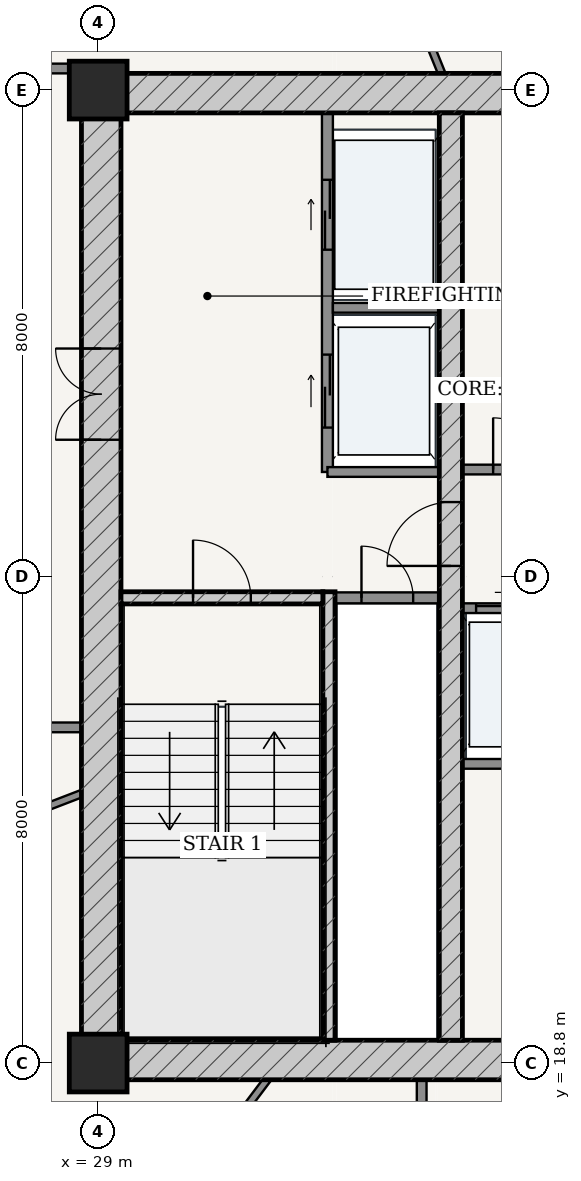
"""IFC4 building model, lengths in metres.
Left out: names, types, materials, properties, quantities, classifications, styles, units other than length and angle.
Written with IfcOpenShell. Run it as: python <this file> out.ifc"""

import sys

from ifc_helpers import new_model, si_unit, direction, frame, frame_2d, origin, origin_2d, place, context, subcontext, project, spatial, rectangle, extrude, source, transform, mapped, element, fill, save


model = new_model("IFC4")
c1 = context("Model", 3, precision=1e-05, world=origin(), true_north=direction((-0.2419218956, 0.970295726276)))
c2 = subcontext(c1, "Body", "Model", "MODEL_VIEW")
j1 = project(units=[si_unit("LENGTHUNIT", "METRE"), si_unit("PLANEANGLEUNIT", "RADIAN")], contexts=[c1])
p1 = place(None, origin())
s1 = spatial("IfcSite", under=j1, at=p1, CompositionType="ELEMENT")
p2 = place(p1, origin())
s2 = spatial("IfcBuilding", under=s1, at=p2, CompositionType="ELEMENT")
p3 = place(p2, frame((0.0, 0.0, 178.6)))
s3 = spatial("IfcBuildingStorey", under=s2, at=p3, CompositionType="ELEMENT", Elevation=178.6)
for number, where, z_axis, x_axis in (
    (1, (29.0, 18.8, 0.0), (0.0, 0.0, 1.0), (1.0, 0.0, 0.0)),
    (2, (29.0, 34.8, 0.0), (0.0, 0.0, 1.0), (1.0, 0.0, 0.0)),
):
    element("IfcColumn", number, at=place(p3, frame(where, z_axis=z_axis, x_axis=x_axis)), inside=s3, PredefinedType="COLUMN", context=c2, shape_type="SweptSolid", body=[
        extrude(rectangle(XDim=0.95, YDim=0.95, at=origin_2d()), origin(), (0.0, 0.0, 1.0), 3.6),
    ])
p4 = place(p3, frame((28.725, 18.85, 0.0), z_axis=(0.0, 0.0, 1.0), x_axis=(1.0, 0.0, 0.0)))
e3 = element("IfcWall", 3, at=p4, inside=s3, PredefinedType="SHEAR", context=c2, shape_type="SweptSolid", body=[
    extrude(rectangle(XDim=18.55, YDim=0.65, at=frame_2d((9.275, 0.0))), origin(), (0.0, 0.0, 1.0), 3.33),
])
p5 = place(p4, frame((7.51, 0.0, 0.0)))
e4 = element("IfcOpeningElement", 4, at=p5, cuts=e3, PredefinedType="OPENING", context=c2, shape_type="SweptSolid", body=[
    extrude(rectangle(XDim=0.85, YDim=2.1, at=frame_2d((0.425, 1.05))), frame((0.0, 0.335, 0.0), z_axis=(0.0, -1.0, 0.0), x_axis=(1.0, 0.0, 0.0)), (0.0, 0.0, 1.0), 0.67),
])
p6 = place(p4, frame((10.59, 0.0, 0.0)))
e5 = element("IfcOpeningElement", 5, at=p6, cuts=e3, PredefinedType="OPENING", context=c2, shape_type="SweptSolid", body=[
    extrude(rectangle(XDim=0.85, YDim=2.1, at=frame_2d((0.425, 1.05))), frame((0.0, 0.335, 0.0), z_axis=(0.0, -1.0, 0.0), x_axis=(1.0, 0.0, 0.0)), (0.0, 0.0, 1.0), 0.67),
])
p7 = place(p3, frame((28.725, 34.75, 0.0), z_axis=(0.0, 0.0, 1.0), x_axis=(1.0, 0.0, 0.0)))
e6 = element("IfcWall", 6, at=p7, inside=s3, PredefinedType="SHEAR", context=c2, shape_type="SweptSolid", body=[
    extrude(rectangle(XDim=18.55, YDim=0.65, at=frame_2d((9.275, 0.0))), origin(), (0.0, 0.0, 1.0), 3.33),
])
p8 = place(p3, frame((29.05, 19.175, 0.0), z_axis=(0.0, 0.0, 1.0), x_axis=(0.0, 1.0, 0.0)))
e7 = element("IfcWall", 7, at=p8, inside=s3, PredefinedType="SHEAR", context=c2, shape_type="SweptSolid", body=[
    extrude(rectangle(XDim=15.25, YDim=0.65, at=frame_2d((7.625, 0.0))), origin(), (0.0, 0.0, 1.0), 3.33),
])
p9 = place(p8, frame((9.875, 0.0, 0.0)))
e8 = element("IfcOpeningElement", 8, at=p9, cuts=e7, PredefinedType="OPENING", context=c2, shape_type="SweptSolid", body=[
    extrude(rectangle(XDim=1.5, YDim=2.2, at=frame_2d((0.75, 1.1))), frame((0.0, 0.335, 0.0), z_axis=(0.0, -1.0, 0.0), x_axis=(1.0, 0.0, 0.0)), (0.0, 0.0, 1.0), 0.67),
])
p10 = place(p3, frame((32.795, 19.175, 0.0), z_axis=(0.0, 0.0, 1.0), x_axis=(0.0, 1.0, 0.0)))
e9 = element("IfcWall", 9, at=p10, inside=s3, PredefinedType="SOLIDWALL", context=c2, shape_type="SweptSolid", body=[
    extrude(rectangle(XDim=7.375, YDim=0.2, at=frame_2d((3.688, 0.0))), origin(), (0.0, 0.0, 1.0), 3.33),
])
p11 = place(p3, frame((29.375, 26.45, 0.0), z_axis=(0.0, 0.0, 1.0), x_axis=(1.0, 0.0, 0.0)))
e10 = element("IfcWall", 10, at=p11, inside=s3, PredefinedType="SOLIDWALL", context=c2, shape_type="SweptSolid", body=[
    extrude(rectangle(XDim=3.32, YDim=0.2, at=frame_2d((1.66, 0.0))), origin(), (0.0, 0.0, 1.0), 3.33),
])
p12 = place(p11, frame((1.185, 0.0, 0.0)))
e11 = element("IfcOpeningElement", 11, at=p12, cuts=e10, PredefinedType="OPENING", context=c2, shape_type="SweptSolid", body=[
    extrude(rectangle(XDim=0.95, YDim=2.15, at=frame_2d((0.475, 1.075))), frame((0.0, 0.11, 0.0), z_axis=(0.0, -1.0, 0.0), x_axis=(1.0, 0.0, 0.0)), (0.0, 0.0, 1.0), 0.22),
])
p13 = place(p3, frame((34.8, 19.175, 0.0), z_axis=(0.0, 0.0, 1.0), x_axis=(0.0, 1.0, 0.0)))
e12 = element("IfcWall", 12, at=p13, inside=s3, PredefinedType="SHEAR", context=c2, shape_type="SweptSolid", body=[
    extrude(rectangle(XDim=15.25, YDim=0.38, at=frame_2d((7.625, 0.0))), origin(), (0.0, 0.0, 1.0), 3.33),
])
p14 = place(p13, frame((7.8, 0.0, 0.0)))
e13 = element("IfcOpeningElement", 13, at=p14, cuts=e12, PredefinedType="OPENING", context=c2, shape_type="SweptSolid", body=[
    extrude(rectangle(XDim=1.05, YDim=2.15, at=frame_2d((0.525, 1.075))), frame((0.0, 0.2, 0.0), z_axis=(0.0, -1.0, 0.0), x_axis=(1.0, 0.0, 0.0)), (0.0, 0.0, 1.0), 0.4),
])
p15 = place(p3, frame((32.9, 26.45, 0.0), z_axis=(0.0, 0.0, 1.0), x_axis=(1.0, 0.0, 0.0)))
e14 = element("IfcWall", 14, at=p15, inside=s3, PredefinedType="PARTITIONING", context=c2, shape_type="SweptSolid", body=[
    extrude(rectangle(XDim=1.71, YDim=0.18, at=frame_2d((0.855, 0.0))), origin(), (0.0, 0.0, 1.0), 3.33),
])
p16 = place(p15, frame((0.43, 0.0, 0.0)))
e15 = element("IfcOpeningElement", 15, at=p16, cuts=e14, PredefinedType="OPENING", context=c2, shape_type="SweptSolid", body=[
    extrude(rectangle(XDim=0.85, YDim=2.1, at=frame_2d((0.425, 1.05))), frame((0.0, 0.1, 0.0), z_axis=(0.0, -1.0, 0.0), x_axis=(1.0, 0.0, 0.0)), (0.0, 0.0, 1.0), 0.2),
])
p17 = place(p3, frame((32.77, 28.52, 0.0), z_axis=(0.0, 0.0, 1.0), x_axis=(0.0, 1.0, 0.0)))
e16 = element("IfcWall", 16, at=p17, inside=s3, PredefinedType="PARTITIONING", context=c2, shape_type="SweptSolid", body=[
    extrude(rectangle(XDim=5.905, YDim=0.18, at=frame_2d((2.953, 0.0))), origin(), (0.0, 0.0, 1.0), 3.33),
])
p18 = place(p17, frame((3.655, 0.0, 0.0)))
e17 = element("IfcOpeningElement", 17, at=p18, cuts=e16, PredefinedType="OPENING", context=c2, shape_type="SweptSolid", body=[
    extrude(rectangle(XDim=1.15, YDim=2.2, at=frame_2d((0.575, 1.1))), frame((0.0, 0.1, 0.0), z_axis=(0.0, -1.0, 0.0), x_axis=(1.0, 0.0, 0.0)), (0.0, 0.0, 1.0), 0.2),
])
p19 = place(p17, frame((0.73, 0.0, 0.0)))
e18 = element("IfcOpeningElement", 18, at=p19, cuts=e16, PredefinedType="OPENING", context=c2, shape_type="SweptSolid", body=[
    extrude(rectangle(XDim=1.2, YDim=2.25, at=frame_2d((0.6, 1.125))), frame((0.0, 0.1, 0.0), z_axis=(0.0, -1.0, 0.0), x_axis=(1.0, 0.0, 0.0)), (0.0, 0.0, 1.0), 0.2),
])
p20 = place(p3, frame((32.86, 31.22, 0.0), z_axis=(0.0, 0.0, 1.0), x_axis=(1.0, 0.0, 0.0)))
e19 = element("IfcWall", 19, at=p20, inside=s3, PredefinedType="PARTITIONING", context=c2, shape_type="SweptSolid", body=[
    extrude(rectangle(XDim=1.75, YDim=0.16, at=frame_2d((0.875, 0.0))), origin(), (0.0, 0.0, 1.0), 3.33),
])
p21 = place(p3, frame((32.77, 28.52, 0.0), z_axis=(0.0, 0.0, 1.0), x_axis=(1.0, 0.0, 0.0)))
e20 = element("IfcWall", 20, at=p21, inside=s3, PredefinedType="PARTITIONING", context=c2, shape_type="SweptSolid", body=[
    extrude(rectangle(XDim=1.84, YDim=0.16, at=frame_2d((0.92, 0.0))), origin(), (0.0, 0.0, 1.0), 3.33),
])
p22 = place(p3, frame((34.99, 28.56, 0.0), z_axis=(0.0, 0.0, 1.0), x_axis=(1.0, 0.0, 0.0)))
e21 = element("IfcWall", 21, at=p22, inside=s3, PredefinedType="PARTITIONING", context=c2, shape_type="SweptSolid", body=[
    extrude(rectangle(XDim=6.02, YDim=0.16, at=frame_2d((3.01, 0.0))), origin(), (0.0, 0.0, 1.0), 3.33),
])
p23 = place(p22, frame((0.505, 0.0, 0.0)))
e22 = element("IfcOpeningElement", 22, at=p23, cuts=e21, PredefinedType="OPENING", context=c2, shape_type="SweptSolid", body=[
    extrude(rectangle(XDim=0.85, YDim=2.1, at=frame_2d((0.425, 1.05))), frame((0.0, 0.09, 0.0), z_axis=(0.0, -1.0, 0.0), x_axis=(1.0, 0.0, 0.0)), (0.0, 0.0, 1.0), 0.18),
])
p24 = place(p22, frame((2.58, 0.0, 0.0)))
e23 = element("IfcOpeningElement", 23, at=p24, cuts=e21, PredefinedType="OPENING", context=c2, shape_type="SweptSolid", body=[
    extrude(rectangle(XDim=0.86, YDim=2.1, at=frame_2d((0.43, 1.05))), frame((0.0, 0.09, 0.0), z_axis=(0.0, -1.0, 0.0), x_axis=(1.0, 0.0, 0.0)), (0.0, 0.0, 1.0), 0.18),
])
p25 = place(p22, frame((4.665, 0.0, 0.0)))
e24 = element("IfcOpeningElement", 24, at=p25, cuts=e21, PredefinedType="OPENING", context=c2, shape_type="SweptSolid", body=[
    extrude(rectangle(XDim=0.85, YDim=2.1, at=frame_2d((0.425, 1.05))), frame((0.0, 0.09, 0.0), z_axis=(0.0, -1.0, 0.0), x_axis=(1.0, 0.0, 0.0)), (0.0, 0.0, 1.0), 0.18),
])
p26 = place(p3, frame((34.99, 26.28, 0.0), z_axis=(0.0, 0.0, 1.0), x_axis=(1.0, 0.0, 0.0)))
e25 = element("IfcWall", 25, at=p26, inside=s3, PredefinedType="PARTITIONING", context=c2, shape_type="SweptSolid", body=[
    extrude(rectangle(XDim=6.02, YDim=0.16, at=frame_2d((3.01, 0.0))), origin(), (0.0, 0.0, 1.0), 3.33),
])
p27 = place(p26, frame((0.225, 0.0, 0.0)))
e26 = element("IfcOpeningElement", 26, at=p27, cuts=e25, PredefinedType="OPENING", context=c2, shape_type="SweptSolid", body=[
    extrude(rectangle(XDim=1.1, YDim=2.2, at=frame_2d((0.55, 1.1))), frame((0.0, 0.09, 0.0), z_axis=(0.0, -1.0, 0.0), x_axis=(1.0, 0.0, 0.0)), (0.0, 0.0, 1.0), 0.18),
])
p28 = place(p26, frame((1.705, 0.0, 0.0)))
e27 = element("IfcOpeningElement", 27, at=p28, cuts=e25, PredefinedType="OPENING", context=c2, shape_type="SweptSolid", body=[
    extrude(rectangle(XDim=1.1, YDim=2.2, at=frame_2d((0.55, 1.1))), frame((0.0, 0.09, 0.0), z_axis=(0.0, -1.0, 0.0), x_axis=(1.0, 0.0, 0.0)), (0.0, 0.0, 1.0), 0.18),
])
p29 = place(p3, frame((34.99, 23.72, 0.0), z_axis=(0.0, 0.0, 1.0), x_axis=(1.0, 0.0, 0.0)))
e28 = element("IfcWall", 28, at=p29, inside=s3, PredefinedType="PARTITIONING", context=c2, shape_type="SweptSolid", body=[
    extrude(rectangle(XDim=6.02, YDim=0.16, at=frame_2d((3.01, 0.0))), origin(), (0.0, 0.0, 1.0), 3.33),
])
p30 = place(p3, frame((26.795, 35.155, 0.0), z_axis=(0.0, 0.0, 1.0), x_axis=(1.0, 0.0, 0.0)))
e29 = element("IfcWall", 29, at=p30, inside=s3, PredefinedType="PARTITIONING", context=c2, shape_type="SweptSolid", body=[
    extrude(rectangle(XDim=1.93, YDim=0.16, at=frame_2d((0.965, 0.0))), origin(), (0.0, 0.0, 1.0), 2.776),
])
p31 = place(p3, frame((26.795, 24.32, 0.0), z_axis=(0.0, 0.0, 1.0), x_axis=(1.0, 0.0, 0.0)))
e30 = element("IfcWall", 30, at=p31, inside=s3, PredefinedType="PARTITIONING", context=c2, shape_type="SweptSolid", body=[
    extrude(rectangle(XDim=1.93, YDim=0.16, at=frame_2d((0.965, 0.0))), origin(), (0.0, 0.0, 1.0), 3.33),
])
p32 = place(p3, frame((34.32, 16.675, 0.0), z_axis=(0.0, 0.0, 1.0), x_axis=(0.0, 1.0, 0.0)))
e31 = element("IfcWall", 31, at=p32, inside=s3, PredefinedType="PARTITIONING", context=c2, shape_type="SweptSolid", body=[
    extrude(rectangle(XDim=1.85, YDim=0.16, at=frame_2d((0.925, 0.0))), origin(), (0.0, 0.0, 1.0), 3.33),
])
p33 = place(p32, frame((0.435, 0.0, 0.0)))
e32 = element("IfcOpeningElement", 32, at=p33, cuts=e31, PredefinedType="OPENING", context=c2, shape_type="SweptSolid", body=[
    extrude(rectangle(XDim=0.98, YDim=2.2, at=frame_2d((0.49, 1.1))), frame((0.0, 0.09, 0.0), z_axis=(0.0, -1.0, 0.0), x_axis=(1.0, 0.0, 0.0)), (0.0, 0.0, 1.0), 0.18),
])
p34 = place(p3, frame((34.649, 35.075, 0.0), z_axis=(0.0, 0.0, 1.0), x_axis=(-0.375339921816, 0.926887233212, 0.0)))
e33 = element("IfcWall", 33, at=p34, inside=s3, PredefinedType="PARTITIONING", context=c2, shape_type="SweptSolid", body=[
    extrude(rectangle(XDim=3.088, YDim=0.12, at=frame_2d((1.544, 0.0))), origin(), (0.0, 0.0, 1.0), 3.33),
])
p35 = place(p3, frame((28.723, 23.229, 0.0), z_axis=(0.0, 0.0, 1.0), x_axis=(-0.933262385607, -0.359195378048, 0.0)))
e34 = element("IfcWall", 34, at=p35, inside=s3, PredefinedType="PARTITIONING", context=c2, shape_type="SweptSolid", body=[
    extrude(rectangle(XDim=5.219, YDim=0.12, at=frame_2d((2.609, 0.0))), origin(), (0.0, 0.0, 1.0), 3.33),
])
p36 = place(p35, frame((2.179, 0.0, 0.0)))
e35 = element("IfcOpeningElement", 35, at=p36, cuts=e34, PredefinedType="OPENING", context=c2, shape_type="SweptSolid", body=[
    extrude(rectangle(XDim=0.86, YDim=2.15, at=frame_2d((0.43, 1.075))), frame((0.0, 0.07, 0.0), z_axis=(0.0, -1.0, 0.0), x_axis=(1.0, 0.0, 0.0)), (0.0, 0.0, 1.0), 0.14),
])
p37 = place(p3, frame((31.777, 18.525, 0.0), z_axis=(0.0, 0.0, 1.0), x_axis=(-0.601054484551, -0.799208049635, 0.0)))
e36 = element("IfcWall", 36, at=p37, inside=s3, PredefinedType="PARTITIONING", context=c2, shape_type="SweptSolid", body=[
    extrude(rectangle(XDim=3.592, YDim=0.12, at=frame_2d((1.796, 0.0))), origin(), (0.0, 0.0, 1.0), 3.33),
])
p38 = place(p37, frame((1.346, 0.0, 0.0)))
e37 = element("IfcOpeningElement", 37, at=p38, cuts=e36, PredefinedType="OPENING", context=c2, shape_type="SweptSolid", body=[
    extrude(rectangle(XDim=0.9, YDim=2.15, at=frame_2d((0.45, 1.075))), frame((0.0, 0.07, 0.0), z_axis=(0.0, -1.0, 0.0), x_axis=(1.0, 0.0, 0.0)), (0.0, 0.0, 1.0), 0.14),
])
m1 = source(origin(), c2, "Body", "SweptSolid", [
    extrude(rectangle(XDim=1.5, YDim=2.2, at=frame_2d((0.75, 1.1))), frame((0.0, 0.025, 0.0), z_axis=(0.0, -1.0, 0.0), x_axis=(1.0, 0.0, 0.0)), (0.0, 0.0, 1.0), 0.05),
])
p39 = place(p9, origin())
e38 = element("IfcDoor", 38, at=p39, inside=s3, OperationType="DOUBLE_DOOR_SINGLE_SWING", PredefinedType="DOOR", context=c2, shape_type="MappedRepresentation", body=[
    mapped(m1, transform((0.0, 0.0, 0.0), scale=1.0)),
])
fill(e8, e38)
m2 = source(origin(), c2, "Body", "SweptSolid", [
    extrude(rectangle(XDim=1.05, YDim=2.15, at=frame_2d((0.525, 1.075))), frame((0.0, 0.025, 0.0), z_axis=(0.0, -1.0, 0.0), x_axis=(1.0, 0.0, 0.0)), (0.0, 0.0, 1.0), 0.05),
])
p40 = place(p14, origin())
e39 = element("IfcDoor", 39, at=p40, inside=s3, OperationType="SINGLE_SWING_LEFT", PredefinedType="DOOR", context=c2, shape_type="MappedRepresentation", body=[
    mapped(m2, transform((0.0, 0.0, 0.0), scale=1.0)),
])
fill(e13, e39)
m3 = source(origin(), c2, "Body", "SweptSolid", [
    extrude(rectangle(XDim=0.95, YDim=2.15, at=frame_2d((0.475, 1.075))), frame((0.0, 0.025, 0.0), z_axis=(0.0, -1.0, 0.0), x_axis=(1.0, 0.0, 0.0)), (0.0, 0.0, 1.0), 0.05),
])
p41 = place(p12, origin())
e40 = element("IfcDoor", 40, at=p41, inside=s3, OperationType="SINGLE_SWING_LEFT", PredefinedType="DOOR", context=c2, shape_type="MappedRepresentation", body=[
    mapped(m3, transform((0.0, 0.0, 0.0), scale=1.0)),
])
fill(e11, e40)
m4 = source(origin(), c2, "Body", "SweptSolid", [
    extrude(rectangle(XDim=0.85, YDim=2.1, at=frame_2d((0.425, 1.05))), frame((0.0, 0.025, 0.0), z_axis=(0.0, -1.0, 0.0), x_axis=(1.0, 0.0, 0.0)), (0.0, 0.0, 1.0), 0.05),
])
p42 = place(p16, origin())
e41 = element("IfcDoor", 41, at=p42, inside=s3, OperationType="SINGLE_SWING_LEFT", PredefinedType="DOOR", context=c2, shape_type="MappedRepresentation", body=[
    mapped(m4, transform((0.0, 0.0, 0.0), scale=1.0)),
])
fill(e15, e41)
p43 = place(p23, origin())
e42 = element("IfcDoor", 42, at=p43, inside=s3, OperationType="SINGLE_SWING_LEFT", PredefinedType="DOOR", context=c2, shape_type="MappedRepresentation", body=[
    mapped(m4, transform((0.0, 0.0, 0.0), scale=1.0)),
])
fill(e22, e42)
m5 = source(origin(), c2, "Body", "SweptSolid", [
    extrude(rectangle(XDim=1.15, YDim=2.2, at=frame_2d((0.575, 1.1))), frame((0.0, 0.025, 0.0), z_axis=(0.0, -1.0, 0.0), x_axis=(1.0, 0.0, 0.0)), (0.0, 0.0, 1.0), 0.05),
])
p44 = place(p18, origin())
e43 = element("IfcDoor", 43, at=p44, inside=s3, OperationType="DOUBLE_DOOR_SLIDING", PredefinedType="DOOR", context=c2, shape_type="MappedRepresentation", body=[
    mapped(m5, transform((0.0, 0.0, 0.0), scale=1.0)),
])
fill(e17, e43)
m6 = source(origin(), c2, "Body", "SweptSolid", [
    extrude(rectangle(XDim=1.2, YDim=2.25, at=frame_2d((0.6, 1.125))), frame((0.0, 0.025, 0.0), z_axis=(0.0, -1.0, 0.0), x_axis=(1.0, 0.0, 0.0)), (0.0, 0.0, 1.0), 0.05),
])
p45 = place(p19, origin())
e44 = element("IfcDoor", 44, at=p45, inside=s3, OperationType="DOUBLE_DOOR_SLIDING", PredefinedType="DOOR", context=c2, shape_type="MappedRepresentation", body=[
    mapped(m6, transform((0.0, 0.0, 0.0), scale=1.0)),
])
fill(e18, e44)
m7 = source(origin(), c2, "Body", "SweptSolid", [
    extrude(rectangle(XDim=1.1, YDim=2.2, at=frame_2d((0.55, 1.1))), frame((0.0, 0.025, 0.0), z_axis=(0.0, -1.0, 0.0), x_axis=(1.0, 0.0, 0.0)), (0.0, 0.0, 1.0), 0.05),
])
p46 = place(p27, origin())
e45 = element("IfcDoor", 45, at=p46, inside=s3, OperationType="DOUBLE_DOOR_SLIDING", PredefinedType="DOOR", context=c2, shape_type="MappedRepresentation", body=[
    mapped(m7, transform((0.0, 0.0, 0.0), scale=1.0)),
])
fill(e26, e45)
save(model, sys.argv[1])
